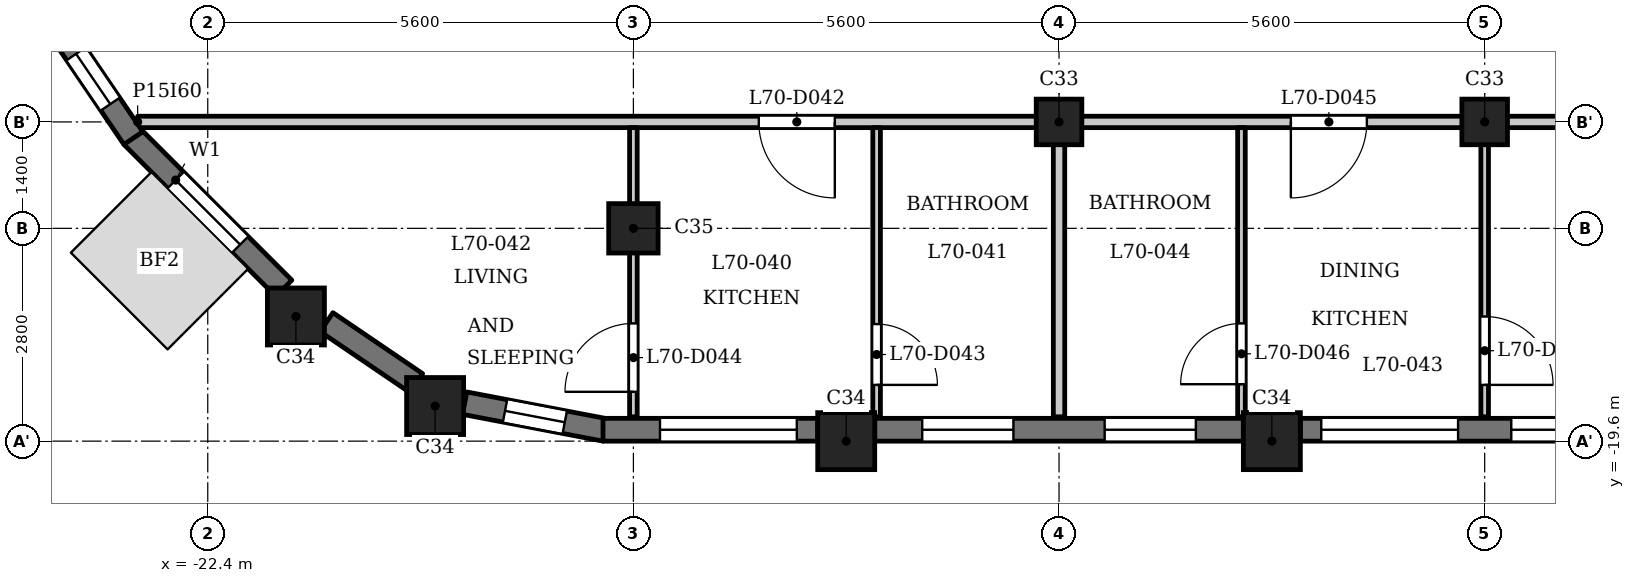
"""IFC4 building model, lengths in metres.
Left out: names, types, materials, properties, quantities, classifications, styles, units other than length and angle.
Written with IfcOpenShell. Run it as: python <this file> out.ifc"""

import sys

from ifc_helpers import new_model, si_unit, direction, frame, frame_2d, origin, origin_2d, place, context, subcontext, project, spatial, rectangle, extrude, element, fill, save


model = new_model("IFC4")
c1 = context("Model", 3, precision=1e-05, world=origin(), true_north=direction((0.0, 1.0)))
c2 = subcontext(c1, "Body", "Model", "MODEL_VIEW")
j1 = project(units=[si_unit("LENGTHUNIT", "METRE"), si_unit("PLANEANGLEUNIT", "RADIAN")], contexts=[c1])
p1 = place(None, origin())
s1 = spatial("IfcSite", under=j1, at=p1, CompositionType="ELEMENT")
p2 = place(p1, origin())
s2 = spatial("IfcBuilding", under=s1, at=p2, CompositionType="ELEMENT")
p3 = place(p2, frame((0.0, 0.0, 269.7)))
s3 = spatial("IfcBuildingStorey", under=s2, at=p3, CompositionType="ELEMENT", Elevation=269.7)
for number, where, z_axis, x_axis in (
    (1, (-19.409, -19.138, 0.0), (0.0, 0.0, 1.0), (1.0, 0.0, 0.0)),
    (2, (-14.0, -19.6, 0.0), (0.0, 0.0, 1.0), (1.0, 0.0, 0.0)),
    (3, (-8.4, -19.6, 0.0), (0.0, 0.0, 1.0), (1.0, 0.0, 0.0)),
    (4, (-21.24, -17.96, 0.0), (0.0, 0.0, 1.0), (1.0, 0.0, 0.0)),
):
    element("IfcColumn", number, at=place(p3, frame(where, z_axis=z_axis, x_axis=x_axis)), inside=s3, PredefinedType="COLUMN", context=c2, shape_type="SweptSolid", body=[
        extrude(rectangle(XDim=0.75, YDim=0.75, at=origin_2d()), origin(), (0.0, 0.0, 1.0), 3.5),
    ])
p4 = place(p3, frame((-16.8, -16.8, 0.0), z_axis=(0.0, 0.0, 1.0), x_axis=(1.0, 0.0, 0.0)))
e5 = element("IfcColumn", 5, at=p4, inside=s3, PredefinedType="COLUMN", context=c2, shape_type="SweptSolid", body=[
    extrude(rectangle(XDim=0.65, YDim=0.65, at=origin_2d()), origin(), (0.0, 0.0, 1.0), 3.5),
])
for number, where, z_axis, x_axis in (
    (6, (-11.2, -15.4, 0.0), (0.0, 0.0, 1.0), (1.0, 0.0, 0.0)),
    (7, (-5.6, -15.4, 0.0), (0.0, 0.0, 1.0), (1.0, 0.0, 0.0)),
):
    element("IfcColumn", number, at=place(p3, frame(where, z_axis=z_axis, x_axis=x_axis)), inside=s3, PredefinedType="COLUMN", context=c2, shape_type="SweptSolid", body=[
        extrude(rectangle(XDim=0.6, YDim=0.6, at=origin_2d()), origin(), (0.0, 0.0, 1.0), 3.5),
    ])
p5 = place(p3, frame((-23.397, -15.591, 0.0), z_axis=(0.0, 0.0, 1.0), x_axis=(0.707106781187, -0.707106781187, 0.0)))
e8 = element("IfcWall", 8, at=p5, inside=s3, PredefinedType="SOLIDWALL", context=c2, shape_type="SweptSolid", body=[
    extrude(rectangle(XDim=2.825, YDim=0.3, at=frame_2d((1.413, 0.0))), origin(), (0.0, 0.0, 1.0), 2.55),
])
p6 = place(p5, frame((0.812, 0.0, 0.6)))
e9 = element("IfcOpeningElement", 9, at=p6, cuts=e8, PredefinedType="OPENING", context=c2, shape_type="SweptSolid", body=[
    extrude(rectangle(XDim=1.2, YDim=1.55, at=frame_2d((0.6, 0.775))), frame((0.0, 0.16, 0.0), z_axis=(0.0, -1.0, 0.0), x_axis=(1.0, 0.0, 0.0)), (0.0, 0.0, 1.0), 0.32),
])
p7 = place(p3, frame((-20.837, -18.034, 0.0), z_axis=(0.0, 0.0, 1.0), x_axis=(0.827095130818, -0.562061957952, 0.0)))
e10 = element("IfcWall", 10, at=p7, inside=s3, PredefinedType="SOLIDWALL", context=c2, shape_type="SweptSolid", body=[
    extrude(rectangle(XDim=1.427, YDim=0.3, at=frame_2d((0.713, 0.0))), origin(), (0.0, 0.0, 1.0), 2.55),
])
p8 = place(p3, frame((-19.02, -19.1, 0.0), z_axis=(0.0, 0.0, 1.0), x_axis=(0.982284001233, -0.187398348234, 0.0)))
e11 = element("IfcWall", 11, at=p8, inside=s3, PredefinedType="SOLIDWALL", context=c2, shape_type="SweptSolid", body=[
    extrude(rectangle(XDim=1.881, YDim=0.3, at=frame_2d((0.941, 0.0))), origin(), (0.0, 0.0, 1.0), 2.55),
])
p9 = place(p8, frame((0.541, 0.0, 0.6)))
e12 = element("IfcOpeningElement", 12, at=p9, cuts=e11, PredefinedType="OPENING", context=c2, shape_type="SweptSolid", body=[
    extrude(rectangle(XDim=0.8, YDim=1.55, at=frame_2d((0.4, 0.775))), frame((0.0, 0.16, 0.0), z_axis=(0.0, -1.0, 0.0), x_axis=(1.0, 0.0, 0.0)), (0.0, 0.0, 1.0), 0.32),
])
p10 = place(p3, frame((-17.2, -19.45, 0.0), z_axis=(0.0, 0.0, 1.0), x_axis=(1.0, 0.0, 0.0)))
e13 = element("IfcWall", 13, at=p10, inside=s3, PredefinedType="SOLIDWALL", context=c2, shape_type="SweptSolid", body=[
    extrude(rectangle(XDim=2.825, YDim=0.3, at=frame_2d((1.413, 0.0))), origin(), (0.0, 0.0, 1.0), 2.55),
])
p11 = place(p10, frame((0.75, 0.0, 0.9)))
e14 = element("IfcOpeningElement", 14, at=p11, cuts=e13, PredefinedType="OPENING", context=c2, shape_type="SweptSolid", body=[
    extrude(rectangle(XDim=1.8, YDim=1.25, at=frame_2d((0.9, 0.625))), frame((0.0, 0.16, 0.0), z_axis=(0.0, -1.0, 0.0), x_axis=(1.0, 0.0, 0.0)), (0.0, 0.0, 1.0), 0.32),
])
p12 = place(p3, frame((-13.625, -19.45, 0.0), z_axis=(0.0, 0.0, 1.0), x_axis=(1.0, 0.0, 0.0)))
e15 = element("IfcWall", 15, at=p12, inside=s3, PredefinedType="SOLIDWALL", context=c2, shape_type="SweptSolid", body=[
    extrude(rectangle(XDim=4.85, YDim=0.3, at=frame_2d((2.425, 0.0))), origin(), (0.0, 0.0, 1.0), 2.55),
])
p13 = place(p12, frame((0.625, 0.0, 0.6)))
e16 = element("IfcOpeningElement", 16, at=p13, cuts=e15, PredefinedType="OPENING", context=c2, shape_type="SweptSolid", body=[
    extrude(rectangle(XDim=1.2, YDim=1.55, at=frame_2d((0.6, 0.775))), frame((0.0, 0.16, 0.0), z_axis=(0.0, -1.0, 0.0), x_axis=(1.0, 0.0, 0.0)), (0.0, 0.0, 1.0), 0.32),
])
p14 = place(p12, frame((3.025, 0.0, 0.6)))
e17 = element("IfcOpeningElement", 17, at=p14, cuts=e15, PredefinedType="OPENING", context=c2, shape_type="SweptSolid", body=[
    extrude(rectangle(XDim=1.2, YDim=1.55, at=frame_2d((0.6, 0.775))), frame((0.0, 0.16, 0.0), z_axis=(0.0, -1.0, 0.0), x_axis=(1.0, 0.0, 0.0)), (0.0, 0.0, 1.0), 0.32),
])
p15 = place(p3, frame((-8.025, -19.45, 0.0), z_axis=(0.0, 0.0, 1.0), x_axis=(1.0, 0.0, 0.0)))
e18 = element("IfcWall", 18, at=p15, inside=s3, PredefinedType="SOLIDWALL", context=c2, shape_type="SweptSolid", body=[
    extrude(rectangle(XDim=4.85, YDim=0.3, at=frame_2d((2.425, 0.0))), origin(), (0.0, 0.0, 1.0), 2.55),
])
p16 = place(p15, frame((0.275, 0.0, 0.9)))
e19 = element("IfcOpeningElement", 19, at=p16, cuts=e18, PredefinedType="OPENING", context=c2, shape_type="SweptSolid", body=[
    extrude(rectangle(XDim=1.8, YDim=1.25, at=frame_2d((0.9, 0.625))), frame((0.0, 0.16, 0.0), z_axis=(0.0, -1.0, 0.0), x_axis=(1.0, 0.0, 0.0)), (0.0, 0.0, 1.0), 0.32),
])
p17 = place(p15, frame((2.775, 0.0, 0.9)))
e20 = element("IfcOpeningElement", 20, at=p17, cuts=e18, PredefinedType="OPENING", context=c2, shape_type="SweptSolid", body=[
    extrude(rectangle(XDim=1.8, YDim=1.25, at=frame_2d((0.9, 0.625))), frame((0.0, 0.16, 0.0), z_axis=(0.0, -1.0, 0.0), x_axis=(1.0, 0.0, 0.0)), (0.0, 0.0, 1.0), 0.32),
])
p18 = place(p3, frame((-24.436, -14.057, 0.0), z_axis=(0.0, 0.0, 1.0), x_axis=(0.562075713892, -0.827085782645, 0.0)))
e21 = element("IfcWall", 21, at=p18, inside=s3, PredefinedType="SOLIDWALL", context=c2, shape_type="SweptSolid", body=[
    extrude(rectangle(XDim=1.881, YDim=0.3, at=frame_2d((0.94, 0.0))), origin(), (0.0, 0.0, 1.0), 2.55),
])
p19 = place(p18, frame((0.541, 0.0, 0.6)))
e22 = element("IfcOpeningElement", 22, at=p19, cuts=e21, PredefinedType="OPENING", context=c2, shape_type="SweptSolid", body=[
    extrude(rectangle(XDim=0.8, YDim=1.55, at=frame_2d((0.4, 0.775))), frame((0.0, 0.16, 0.0), z_axis=(0.0, -1.0, 0.0), x_axis=(1.0, 0.0, 0.0)), (0.0, 0.0, 1.0), 0.32),
])
p20 = place(p3, frame((-23.322, -15.4, 0.0), z_axis=(0.0, 0.0, 1.0), x_axis=(1.0, 0.0, 0.0)))
e23 = element("IfcWall", 23, at=p20, inside=s3, PredefinedType="PARTITIONING", context=c2, shape_type="SweptSolid", body=[
    extrude(rectangle(XDim=46.872, YDim=0.15, at=frame_2d((23.436, 0.0))), origin(), (0.0, 0.0, 1.0), 3.2),
])
p21 = place(p20, frame((8.172, 0.0, 0.0)))
e24 = element("IfcOpeningElement", 24, at=p21, cuts=e23, PredefinedType="OPENING", context=c2, shape_type="SweptSolid", body=[
    extrude(rectangle(XDim=1.0, YDim=2.1, at=frame_2d((0.5, 1.05))), frame((0.0, 0.085, 0.0), z_axis=(0.0, -1.0, 0.0), x_axis=(1.0, 0.0, 0.0)), (0.0, 0.0, 1.0), 0.17),
])
p22 = place(p20, frame((15.172, 0.0, 0.0)))
e25 = element("IfcOpeningElement", 25, at=p22, cuts=e23, PredefinedType="OPENING", context=c2, shape_type="SweptSolid", body=[
    extrude(rectangle(XDim=1.0, YDim=2.1, at=frame_2d((0.5, 1.05))), frame((0.0, 0.085, 0.0), z_axis=(0.0, -1.0, 0.0), x_axis=(1.0, 0.0, 0.0)), (0.0, 0.0, 1.0), 0.17),
])
p23 = place(p20, frame((31.972, 0.0, 0.0)))
e26 = element("IfcOpeningElement", 26, at=p23, cuts=e23, PredefinedType="OPENING", context=c2, shape_type="SweptSolid", body=[
    extrude(rectangle(XDim=1.0, YDim=2.1, at=frame_2d((0.5, 1.05))), frame((0.0, 0.085, 0.0), z_axis=(0.0, -1.0, 0.0), x_axis=(1.0, 0.0, 0.0)), (0.0, 0.0, 1.0), 0.17),
])
p24 = place(p3, frame((-16.8, -19.28, 0.0), z_axis=(0.0, 0.0, 1.0), x_axis=(0.0, 1.0, 0.0)))
e27 = element("IfcWall", 27, at=p24, inside=s3, PredefinedType="PARTITIONING", context=c2, shape_type="SweptSolid", body=[
    extrude(rectangle(XDim=3.805, YDim=0.1, at=frame_2d((1.902, 0.0))), origin(), (0.0, 0.0, 1.0), 3.2),
])
p25 = place(p24, frame((0.329, 0.0, 0.0)))
e28 = element("IfcOpeningElement", 28, at=p25, cuts=e27, PredefinedType="OPENING", context=c2, shape_type="SweptSolid", body=[
    extrude(rectangle(XDim=0.9, YDim=2.1, at=frame_2d((0.45, 1.05))), frame((0.0, 0.06, 0.0), z_axis=(0.0, -1.0, 0.0), x_axis=(1.0, 0.0, 0.0)), (0.0, 0.0, 1.0), 0.12),
])
p26 = place(p3, frame((-13.6, -19.28, 0.0), z_axis=(0.0, 0.0, 1.0), x_axis=(0.0, 1.0, 0.0)))
e29 = element("IfcWall", 29, at=p26, inside=s3, PredefinedType="PARTITIONING", context=c2, shape_type="SweptSolid", body=[
    extrude(rectangle(XDim=3.805, YDim=0.1, at=frame_2d((1.902, 0.0))), origin(), (0.0, 0.0, 1.0), 3.2),
])
p27 = place(p26, frame((0.42, 0.0, 0.0)))
e30 = element("IfcOpeningElement", 30, at=p27, cuts=e29, PredefinedType="OPENING", context=c2, shape_type="SweptSolid", body=[
    extrude(rectangle(XDim=0.8, YDim=2.1, at=frame_2d((0.4, 1.05))), frame((0.0, 0.06, 0.0), z_axis=(0.0, -1.0, 0.0), x_axis=(1.0, 0.0, 0.0)), (0.0, 0.0, 1.0), 0.12),
])
p28 = place(p3, frame((-11.2, -19.28, 0.0), z_axis=(0.0, 0.0, 1.0), x_axis=(0.0, 1.0, 0.0)))
e31 = element("IfcWall", 31, at=p28, inside=s3, PredefinedType="PARTITIONING", context=c2, shape_type="SweptSolid", body=[
    extrude(rectangle(XDim=3.805, YDim=0.15, at=frame_2d((1.902, 0.0))), origin(), (0.0, 0.0, 1.0), 3.2),
])
p29 = place(p3, frame((-8.8, -19.28, 0.0), z_axis=(0.0, 0.0, 1.0), x_axis=(0.0, 1.0, 0.0)))
e32 = element("IfcWall", 32, at=p29, inside=s3, PredefinedType="PARTITIONING", context=c2, shape_type="SweptSolid", body=[
    extrude(rectangle(XDim=3.805, YDim=0.1, at=frame_2d((1.902, 0.0))), origin(), (0.0, 0.0, 1.0), 3.2),
])
p30 = place(p29, frame((0.429, 0.0, 0.0)))
e33 = element("IfcOpeningElement", 33, at=p30, cuts=e32, PredefinedType="OPENING", context=c2, shape_type="SweptSolid", body=[
    extrude(rectangle(XDim=0.8, YDim=2.1, at=frame_2d((0.4, 1.05))), frame((0.0, 0.06, 0.0), z_axis=(0.0, -1.0, 0.0), x_axis=(1.0, 0.0, 0.0)), (0.0, 0.0, 1.0), 0.12),
])
p31 = place(p3, frame((-5.6, -19.28, 0.0), z_axis=(0.0, 0.0, 1.0), x_axis=(0.0, 1.0, 0.0)))
e34 = element("IfcWall", 34, at=p31, inside=s3, PredefinedType="PARTITIONING", context=c2, shape_type="SweptSolid", body=[
    extrude(rectangle(XDim=3.805, YDim=0.1, at=frame_2d((1.902, 0.0))), origin(), (0.0, 0.0, 1.0), 3.2),
])
p32 = place(p31, frame((0.42, 0.0, 0.0)))
e35 = element("IfcOpeningElement", 35, at=p32, cuts=e34, PredefinedType="OPENING", context=c2, shape_type="SweptSolid", body=[
    extrude(rectangle(XDim=0.9, YDim=2.1, at=frame_2d((0.45, 1.05))), frame((0.0, 0.06, 0.0), z_axis=(0.0, -1.0, 0.0), x_axis=(1.0, 0.0, 0.0)), (0.0, 0.0, 1.0), 0.12),
])
p33 = place(p21, origin())
e36 = element("IfcDoor", 36, at=p33, inside=s3, OperationType="SINGLE_SWING_RIGHT", PredefinedType="DOOR", context=c2, shape_type="SweptSolid", body=[
    extrude(rectangle(XDim=1.0, YDim=2.1, at=frame_2d((0.5, 1.05))), frame((0.0, 0.025, 0.0), z_axis=(0.0, -1.0, 0.0), x_axis=(1.0, 0.0, 0.0)), (0.0, 0.0, 1.0), 0.05),
])
fill(e24, e36)
p34 = place(p27, origin())
e37 = element("IfcDoor", 37, at=p34, inside=s3, OperationType="SINGLE_SWING_LEFT", PredefinedType="DOOR", context=c2, shape_type="SweptSolid", body=[
    extrude(rectangle(XDim=0.8, YDim=2.1, at=frame_2d((0.4, 1.05))), frame((0.0, 0.025, 0.0), z_axis=(0.0, -1.0, 0.0), x_axis=(1.0, 0.0, 0.0)), (0.0, 0.0, 1.0), 0.05),
])
fill(e30, e37)
p35 = place(p25, origin())
e38 = element("IfcDoor", 38, at=p35, inside=s3, OperationType="SINGLE_SWING_RIGHT", PredefinedType="DOOR", context=c2, shape_type="SweptSolid", body=[
    extrude(rectangle(XDim=0.9, YDim=2.1, at=frame_2d((0.45, 1.05))), frame((0.0, 0.025, 0.0), z_axis=(0.0, -1.0, 0.0), x_axis=(1.0, 0.0, 0.0)), (0.0, 0.0, 1.0), 0.05),
])
fill(e28, e38)
p36 = place(p22, origin())
e39 = element("IfcDoor", 39, at=p36, inside=s3, OperationType="SINGLE_SWING_LEFT", PredefinedType="DOOR", context=c2, shape_type="SweptSolid", body=[
    extrude(rectangle(XDim=1.0, YDim=2.1, at=frame_2d((0.5, 1.05))), frame((0.0, 0.025, 0.0), z_axis=(0.0, -1.0, 0.0), x_axis=(1.0, 0.0, 0.0)), (0.0, 0.0, 1.0), 0.05),
])
fill(e25, e39)
p37 = place(p30, origin())
e40 = element("IfcDoor", 40, at=p37, inside=s3, OperationType="SINGLE_SWING_RIGHT", PredefinedType="DOOR", context=c2, shape_type="SweptSolid", body=[
    extrude(rectangle(XDim=0.8, YDim=2.1, at=frame_2d((0.4, 1.05))), frame((0.0, 0.025, 0.0), z_axis=(0.0, -1.0, 0.0), x_axis=(1.0, 0.0, 0.0)), (0.0, 0.0, 1.0), 0.05),
])
fill(e33, e40)
p38 = place(p32, origin())
e41 = element("IfcDoor", 41, at=p38, inside=s3, OperationType="SINGLE_SWING_LEFT", PredefinedType="DOOR", context=c2, shape_type="SweptSolid", body=[
    extrude(rectangle(XDim=0.9, YDim=2.1, at=frame_2d((0.45, 1.05))), frame((0.0, 0.025, 0.0), z_axis=(0.0, -1.0, 0.0), x_axis=(1.0, 0.0, 0.0)), (0.0, 0.0, 1.0), 0.05),
])
fill(e35, e41)
p39 = place(p6, origin())
e42 = element("IfcWindow", 42, at=p39, inside=s3, PartitioningType="SINGLE_PANEL", PredefinedType="WINDOW", context=c2, shape_type="SweptSolid", body=[
    extrude(rectangle(XDim=1.2, YDim=1.55, at=frame_2d((0.6, 0.775))), frame((0.0, 0.03, 0.0), z_axis=(0.0, -1.0, 0.0), x_axis=(1.0, 0.0, 0.0)), (0.0, 0.0, 1.0), 0.06),
])
fill(e9, e42)
p40 = place(p9, origin())
e43 = element("IfcWindow", 43, at=p40, inside=s3, PartitioningType="SINGLE_PANEL", PredefinedType="WINDOW", context=c2, shape_type="SweptSolid", body=[
    extrude(rectangle(XDim=0.8, YDim=1.55, at=frame_2d((0.4, 0.775))), frame((0.0, 0.03, 0.0), z_axis=(0.0, -1.0, 0.0), x_axis=(1.0, 0.0, 0.0)), (0.0, 0.0, 1.0), 0.06),
])
fill(e12, e43)
p41 = place(p11, origin())
e44 = element("IfcWindow", 44, at=p41, inside=s3, PartitioningType="SINGLE_PANEL", PredefinedType="WINDOW", context=c2, shape_type="SweptSolid", body=[
    extrude(rectangle(XDim=1.8, YDim=1.25, at=frame_2d((0.9, 0.625))), frame((0.0, 0.03, 0.0), z_axis=(0.0, -1.0, 0.0), x_axis=(1.0, 0.0, 0.0)), (0.0, 0.0, 1.0), 0.06),
])
fill(e14, e44)
p42 = place(p13, origin())
e45 = element("IfcWindow", 45, at=p42, inside=s3, PartitioningType="SINGLE_PANEL", PredefinedType="WINDOW", context=c2, shape_type="SweptSolid", body=[
    extrude(rectangle(XDim=1.2, YDim=1.55, at=frame_2d((0.6, 0.775))), frame((0.0, 0.03, 0.0), z_axis=(0.0, -1.0, 0.0), x_axis=(1.0, 0.0, 0.0)), (0.0, 0.0, 1.0), 0.06),
])
fill(e16, e45)
p43 = place(p14, origin())
e46 = element("IfcWindow", 46, at=p43, inside=s3, PartitioningType="SINGLE_PANEL", PredefinedType="WINDOW", context=c2, shape_type="SweptSolid", body=[
    extrude(rectangle(XDim=1.2, YDim=1.55, at=frame_2d((0.6, 0.775))), frame((0.0, 0.03, 0.0), z_axis=(0.0, -1.0, 0.0), x_axis=(1.0, 0.0, 0.0)), (0.0, 0.0, 1.0), 0.06),
])
fill(e17, e46)
p44 = place(p16, origin())
e47 = element("IfcWindow", 47, at=p44, inside=s3, PartitioningType="SINGLE_PANEL", PredefinedType="WINDOW", context=c2, shape_type="SweptSolid", body=[
    extrude(rectangle(XDim=1.8, YDim=1.25, at=frame_2d((0.9, 0.625))), frame((0.0, 0.03, 0.0), z_axis=(0.0, -1.0, 0.0), x_axis=(1.0, 0.0, 0.0)), (0.0, 0.0, 1.0), 0.06),
])
fill(e19, e47)
p45 = place(p17, origin())
e48 = element("IfcWindow", 48, at=p45, inside=s3, PartitioningType="SINGLE_PANEL", PredefinedType="WINDOW", context=c2, shape_type="SweptSolid", body=[
    extrude(rectangle(XDim=1.8, YDim=1.25, at=frame_2d((0.9, 0.625))), frame((0.0, 0.03, 0.0), z_axis=(0.0, -1.0, 0.0), x_axis=(1.0, 0.0, 0.0)), (0.0, 0.0, 1.0), 0.06),
])
fill(e20, e48)
p46 = place(p19, origin())
e49 = element("IfcWindow", 49, at=p46, inside=s3, PartitioningType="SINGLE_PANEL", PredefinedType="WINDOW", context=c2, shape_type="SweptSolid", body=[
    extrude(rectangle(XDim=0.8, YDim=1.55, at=frame_2d((0.4, 0.775))), frame((0.0, 0.03, 0.0), z_axis=(0.0, -1.0, 0.0), x_axis=(1.0, 0.0, 0.0)), (0.0, 0.0, 1.0), 0.06),
])
fill(e22, e49)
save(model, sys.argv[1])
